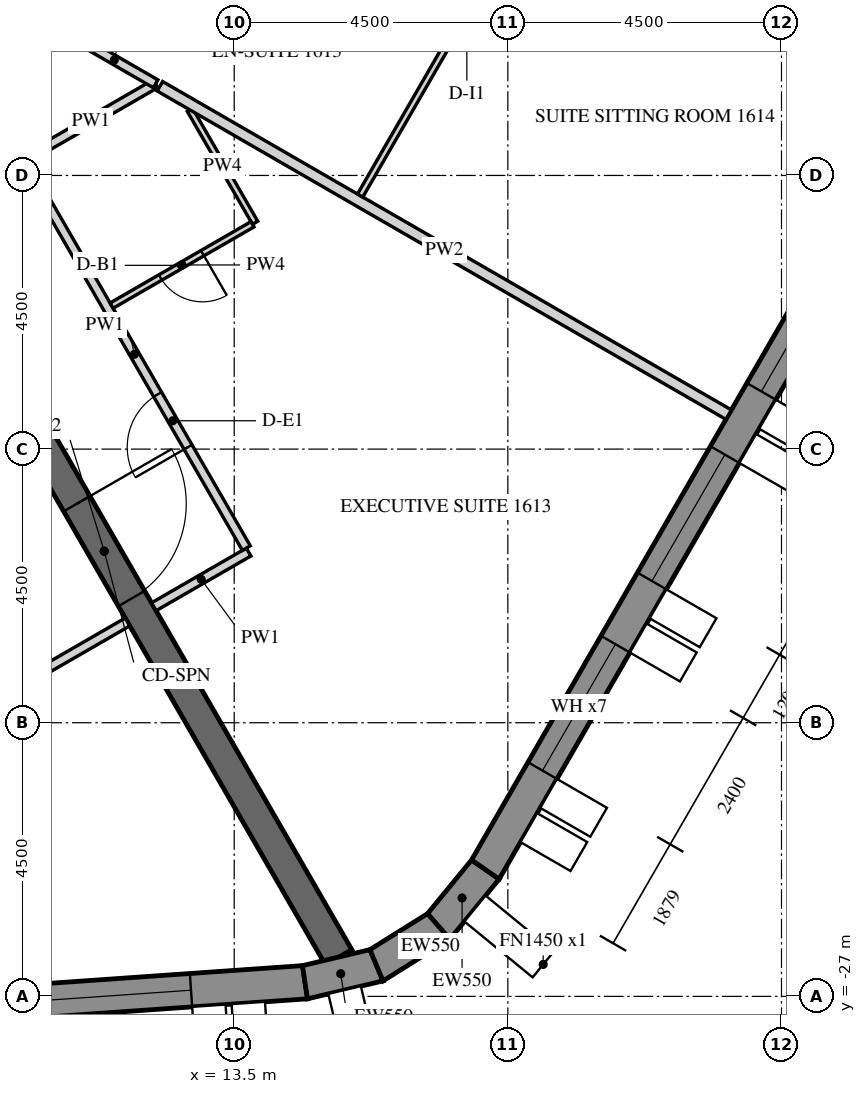
"""IFC4 building model, lengths in metres.
Left out: names, types, materials, properties, quantities, classifications, styles, units other than length and angle.
Written with IfcOpenShell. Run it as: python <this file> out.ifc"""

import sys

from ifc_helpers import new_model, si_unit, direction, frame, frame_2d, origin, place, context, subcontext, project, spatial, polyline, rectangle, outline, extrude, element, fill, save


model = new_model("IFC4")
c1 = context("Model", 3, precision=1e-05, world=origin(), true_north=direction((0.0, 1.0)))
c2 = subcontext(c1, "Body", "Model", "MODEL_VIEW")
j1 = project(units=[si_unit("LENGTHUNIT", "METRE"), si_unit("PLANEANGLEUNIT", "RADIAN")], contexts=[c1])
p1 = place(None, origin())
s1 = spatial("IfcSite", under=j1, at=p1, CompositionType="ELEMENT")
p2 = place(p1, origin())
s2 = spatial("IfcBuilding", under=s1, at=p2, CompositionType="ELEMENT")
p3 = place(p2, frame((0.0, 0.0, 207.3)))
s3 = spatial("IfcBuildingStorey", under=s2, at=p3, CompositionType="ELEMENT", Elevation=207.3)
p4 = place(p3, frame((-13.026, -28.704, -0.15), z_axis=(0.0, 0.0, 1.0), x_axis=(0.99756406806, 0.069756219185, 0.0)))
e1 = element("IfcWall", 1, at=p4, inside=s3, PredefinedType="SOLIDWALL", context=c2, shape_type="SweptSolid", body=[
    extrude(outline(polyline([(-0.026, -0.275), (27.78, -0.275), (27.735, 0.275), (0.026, 0.275), (-0.026, -0.275)])), origin(), (0.0, 0.0, 1.0), 3.9),
])
p5 = place(p4, frame((1.879, 0.0, 1.05)))
e2 = element("IfcOpeningElement", 2, at=p5, cuts=e1, PredefinedType="OPENING", context=c2, shape_type="SweptSolid", body=[
    extrude(rectangle(XDim=2.4, YDim=2.4, at=frame_2d((1.2, 1.2))), frame((0.0, 0.285, 0.0), z_axis=(0.0, -1.0, 0.0), x_axis=(1.0, 0.0, 0.0)), (0.0, 0.0, 1.0), 0.57),
])
p6 = place(p4, frame((5.479, 0.0, 1.05)))
e3 = element("IfcOpeningElement", 3, at=p6, cuts=e1, PredefinedType="OPENING", context=c2, shape_type="SweptSolid", body=[
    extrude(rectangle(XDim=2.4, YDim=2.4, at=frame_2d((1.2, 1.2))), frame((0.0, 0.285, 0.0), z_axis=(0.0, -1.0, 0.0), x_axis=(1.0, 0.0, 0.0)), (0.0, 0.0, 1.0), 0.57),
])
p7 = place(p4, frame((9.079, 0.0, 1.05)))
e4 = element("IfcOpeningElement", 4, at=p7, cuts=e1, PredefinedType="OPENING", context=c2, shape_type="SweptSolid", body=[
    extrude(rectangle(XDim=2.4, YDim=2.4, at=frame_2d((1.2, 1.2))), frame((0.0, 0.285, 0.0), z_axis=(0.0, -1.0, 0.0), x_axis=(1.0, 0.0, 0.0)), (0.0, 0.0, 1.0), 0.57),
])
p8 = place(p4, frame((12.679, 0.0, 1.05)))
e5 = element("IfcOpeningElement", 5, at=p8, cuts=e1, PredefinedType="OPENING", context=c2, shape_type="SweptSolid", body=[
    extrude(rectangle(XDim=2.4, YDim=2.4, at=frame_2d((1.2, 1.2))), frame((0.0, 0.285, 0.0), z_axis=(0.0, -1.0, 0.0), x_axis=(1.0, 0.0, 0.0)), (0.0, 0.0, 1.0), 0.57),
])
p9 = place(p4, frame((16.279, 0.0, 1.05)))
e6 = element("IfcOpeningElement", 6, at=p9, cuts=e1, PredefinedType="OPENING", context=c2, shape_type="SweptSolid", body=[
    extrude(rectangle(XDim=2.4, YDim=2.4, at=frame_2d((1.2, 1.2))), frame((0.0, 0.285, 0.0), z_axis=(0.0, -1.0, 0.0), x_axis=(1.0, 0.0, 0.0)), (0.0, 0.0, 1.0), 0.57),
])
p10 = place(p4, frame((19.879, 0.0, 1.05)))
e7 = element("IfcOpeningElement", 7, at=p10, cuts=e1, PredefinedType="OPENING", context=c2, shape_type="SweptSolid", body=[
    extrude(rectangle(XDim=2.4, YDim=2.4, at=frame_2d((1.2, 1.2))), frame((0.0, 0.285, 0.0), z_axis=(0.0, -1.0, 0.0), x_axis=(1.0, 0.0, 0.0)), (0.0, 0.0, 1.0), 0.57),
])
p11 = place(p4, frame((23.479, 0.0, 1.05)))
e8 = element("IfcOpeningElement", 8, at=p11, cuts=e1, PredefinedType="OPENING", context=c2, shape_type="SweptSolid", body=[
    extrude(rectangle(XDim=2.4, YDim=2.4, at=frame_2d((1.2, 1.2))), frame((0.0, 0.285, 0.0), z_axis=(0.0, -1.0, 0.0), x_axis=(1.0, 0.0, 0.0)), (0.0, 0.0, 1.0), 0.57),
])
p12 = place(p3, frame((14.664, -26.767, -0.15), z_axis=(0.0, 0.0, 1.0), x_axis=(0.973063591128, 0.230536868247, 0.0)))
e9 = element("IfcWall", 9, at=p12, inside=s3, PredefinedType="SOLIDWALL", context=c2, shape_type="SweptSolid", body=[
    extrude(outline(polyline([(-0.022, -0.275), (1.253, -0.275), (1.163, 0.275), (0.022, 0.275), (-0.022, -0.275)])), origin(), (0.0, 0.0, 1.0), 3.9),
])
p13 = place(p3, frame((15.84, -26.489, -0.15), z_axis=(0.0, 0.0, 1.0), x_axis=(0.848009655012, 0.52998077796, 0.0)))
e10 = element("IfcWall", 10, at=p13, inside=s3, PredefinedType="SOLIDWALL", context=c2, shape_type="SweptSolid", body=[
    extrude(outline(polyline([(-0.045, -0.275), (1.253, -0.275), (1.163, 0.275), (0.045, 0.275), (-0.045, -0.275)])), origin(), (0.0, 0.0, 1.0), 3.9),
])
p14 = place(p3, frame((16.864, -25.848, -0.15), z_axis=(0.0, 0.0, 1.0), x_axis=(0.633842757806, 0.773461930787, 0.0)))
e11 = element("IfcWall", 11, at=p14, inside=s3, PredefinedType="SOLIDWALL", context=c2, shape_type="SweptSolid", body=[
    extrude(outline(polyline([(-0.045, -0.275), (1.231, -0.275), (1.186, 0.275), (0.045, 0.275), (-0.045, -0.275)])), origin(), (0.0, 0.0, 1.0), 3.9),
])
p15 = place(p3, frame((17.63, -24.914, -0.15), z_axis=(0.0, 0.0, 1.0), x_axis=(0.499998569178, 0.866026229868, 0.0)))
e12 = element("IfcWall", 12, at=p15, inside=s3, PredefinedType="SOLIDWALL", context=c2, shape_type="SweptSolid", body=[
    extrude(outline(polyline([(-0.022, -0.275), (27.783, -0.275), (27.732, 0.275), (0.022, 0.275), (-0.022, -0.275)])), origin(), (0.0, 0.0, 1.0), 3.9),
])
p16 = place(p15, frame((1.879, 0.0, 1.05)))
e13 = element("IfcOpeningElement", 13, at=p16, cuts=e12, PredefinedType="OPENING", context=c2, shape_type="SweptSolid", body=[
    extrude(rectangle(XDim=2.4, YDim=2.4, at=frame_2d((1.2, 1.2))), frame((0.0, 0.285, 0.0), z_axis=(0.0, -1.0, 0.0), x_axis=(1.0, 0.0, 0.0)), (0.0, 0.0, 1.0), 0.57),
])
p17 = place(p15, frame((5.479, 0.0, 1.05)))
e14 = element("IfcOpeningElement", 14, at=p17, cuts=e12, PredefinedType="OPENING", context=c2, shape_type="SweptSolid", body=[
    extrude(rectangle(XDim=2.4, YDim=2.4, at=frame_2d((1.2, 1.2))), frame((0.0, 0.285, 0.0), z_axis=(0.0, -1.0, 0.0), x_axis=(1.0, 0.0, 0.0)), (0.0, 0.0, 1.0), 0.57),
])
p18 = place(p15, frame((9.079, 0.0, 1.05)))
e15 = element("IfcOpeningElement", 15, at=p18, cuts=e12, PredefinedType="OPENING", context=c2, shape_type="SweptSolid", body=[
    extrude(rectangle(XDim=2.4, YDim=2.4, at=frame_2d((1.2, 1.2))), frame((0.0, 0.285, 0.0), z_axis=(0.0, -1.0, 0.0), x_axis=(1.0, 0.0, 0.0)), (0.0, 0.0, 1.0), 0.57),
])
p19 = place(p15, frame((12.679, 0.0, 1.05)))
e16 = element("IfcOpeningElement", 16, at=p19, cuts=e12, PredefinedType="OPENING", context=c2, shape_type="SweptSolid", body=[
    extrude(rectangle(XDim=2.4, YDim=2.4, at=frame_2d((1.2, 1.2))), frame((0.0, 0.285, 0.0), z_axis=(0.0, -1.0, 0.0), x_axis=(1.0, 0.0, 0.0)), (0.0, 0.0, 1.0), 0.57),
])
p20 = place(p15, frame((16.279, 0.0, 1.05)))
e17 = element("IfcOpeningElement", 17, at=p20, cuts=e12, PredefinedType="OPENING", context=c2, shape_type="SweptSolid", body=[
    extrude(rectangle(XDim=2.4, YDim=2.4, at=frame_2d((1.2, 1.2))), frame((0.0, 0.285, 0.0), z_axis=(0.0, -1.0, 0.0), x_axis=(1.0, 0.0, 0.0)), (0.0, 0.0, 1.0), 0.57),
])
p21 = place(p15, frame((19.879, 0.0, 1.05)))
e18 = element("IfcOpeningElement", 18, at=p21, cuts=e12, PredefinedType="OPENING", context=c2, shape_type="SweptSolid", body=[
    extrude(rectangle(XDim=2.4, YDim=2.4, at=frame_2d((1.2, 1.2))), frame((0.0, 0.285, 0.0), z_axis=(0.0, -1.0, 0.0), x_axis=(1.0, 0.0, 0.0)), (0.0, 0.0, 1.0), 0.57),
])
p22 = place(p15, frame((23.479, 0.0, 1.05)))
e19 = element("IfcOpeningElement", 19, at=p22, cuts=e12, PredefinedType="OPENING", context=c2, shape_type="SweptSolid", body=[
    extrude(rectangle(XDim=2.4, YDim=2.4, at=frame_2d((1.2, 1.2))), frame((0.0, 0.285, 0.0), z_axis=(0.0, -1.0, 0.0), x_axis=(1.0, 0.0, 0.0)), (0.0, 0.0, 1.0), 0.57),
])
p23 = place(p3, frame((7.361, -12.75, -0.15), z_axis=(0.0, 0.0, 1.0), x_axis=(0.50000571537, 0.866022103989, 0.0)))
e20 = element("IfcWall", 20, at=p23, inside=s3, PredefinedType="SHEAR", context=c2, shape_type="SweptSolid", body=[
    extrude(outline(polyline([(-0.144, -0.25), (14.867, -0.25), (14.578, 0.25), (0.144, 0.25), (-0.144, -0.25)])), origin(), (0.0, 0.0, 1.0), 3.9),
])
p24 = place(p23, frame((6.49, 0.0, 0.15)))
e21 = element("IfcOpeningElement", 21, at=p24, cuts=e20, PredefinedType="OPENING", context=c2, shape_type="SweptSolid", body=[
    extrude(rectangle(XDim=1.8, YDim=2.4, at=frame_2d((0.9, 1.2))), frame((0.0, 0.26, 0.0), z_axis=(0.0, -1.0, 0.0), x_axis=(1.0, 0.0, 0.0)), (0.0, 0.0, 1.0), 0.52),
])
p25 = place(p3, frame((7.506, -13.0, -0.15), z_axis=(0.0, 0.0, 1.0), x_axis=(0.499988271576, -0.866032175087, 0.0)))
e22 = element("IfcWall", 22, at=p25, inside=s3, PredefinedType="SHEAR", context=c2, shape_type="SweptSolid", body=[
    extrude(rectangle(XDim=15.424, YDim=0.5, at=frame_2d((7.712, 0.0))), origin(), (0.0, 0.0, 1.0), 3.9),
])
p26 = place(p25, frame((6.812, 0.0, 0.15)))
e23 = element("IfcOpeningElement", 23, at=p26, cuts=e22, PredefinedType="OPENING", context=c2, shape_type="SweptSolid", body=[
    extrude(rectangle(XDim=1.8, YDim=2.4, at=frame_2d((0.9, 1.2))), frame((0.0, 0.26, 0.0), z_axis=(0.0, -1.0, 0.0), x_axis=(1.0, 0.0, 0.0)), (0.0, 0.0, 1.0), 0.52),
])
p27 = place(p3, frame((10.251, -21.705, 0.0), z_axis=(0.0, 0.0, 1.0), x_axis=(0.866013532718, 0.500020560727, 0.0)))
e24 = element("IfcWall", 24, at=p27, inside=s3, PredefinedType="PARTITIONING", context=c2, shape_type="SweptSolid", body=[
    extrude(rectangle(XDim=1.725, YDim=0.15, at=frame_2d((0.863, 0.0))), origin(), (0.0, 0.0, 1.0), 2.988),
])
p28 = place(p3, frame((12.178, -20.593, 0.0), z_axis=(0.0, 0.0, 1.0), x_axis=(0.866047807691, 0.499961193289, 0.0)))
e25 = element("IfcWall", 25, at=p28, inside=s3, PredefinedType="PARTITIONING", context=c2, shape_type="SweptSolid", body=[
    extrude(rectangle(XDim=1.8, YDim=0.15, at=frame_2d((0.9, 0.0))), origin(), (0.0, 0.0, 1.0), 2.988),
])
p29 = place(p3, frame((13.699, -19.628, 0.0), z_axis=(0.0, 0.0, 1.0), x_axis=(-0.499995202058, 0.86602817386, 0.0)))
e26 = element("IfcWall", 26, at=p29, inside=s3, PredefinedType="PARTITIONING", context=c2, shape_type="SweptSolid", body=[
    extrude(rectangle(XDim=7.361, YDim=0.15, at=frame_2d((3.68, 0.0))), origin(), (0.0, 0.0, 1.0), 2.988),
])
p30 = place(p29, frame((1.918, 0.0, 0.0)))
e27 = element("IfcOpeningElement", 27, at=p30, cuts=e26, PredefinedType="OPENING", context=c2, shape_type="SweptSolid", body=[
    extrude(rectangle(XDim=1.0, YDim=2.1, at=frame_2d((0.5, 1.05))), frame((0.0, 0.085, 0.0), z_axis=(0.0, -1.0, 0.0), x_axis=(1.0, 0.0, 0.0)), (0.0, 0.0, 1.0), 0.17),
])
p31 = place(p3, frame((10.084, -13.216, 0.0), z_axis=(0.0, 0.0, 1.0), x_axis=(0.866026229868, 0.499998569178, 0.0)))
e28 = element("IfcWall", 28, at=p31, inside=s3, PredefinedType="PARTITIONING", context=c2, shape_type="SweptSolid", body=[
    extrude(rectangle(XDim=2.449, YDim=0.15, at=frame_2d((1.225, 0.0))), origin(), (0.0, 0.0, 1.0), 2.988),
])
p32 = place(p3, frame((12.208, -11.993, 0.0), z_axis=(0.0, 0.0, 1.0), x_axis=(-0.866011891242, 0.50002340368, 0.0)))
e29 = element("IfcWall", 29, at=p32, inside=s3, PredefinedType="PARTITIONING", context=c2, shape_type="SweptSolid", body=[
    extrude(rectangle(XDim=1.568, YDim=0.15, at=frame_2d((0.784, 0.0))), origin(), (0.0, 0.0, 1.0), 2.988),
])
p33 = place(p3, frame((12.772, -12.423, 0.0), z_axis=(0.0, 0.0, 1.0), x_axis=(0.500061136393, -0.865990103794, 0.0)))
e30 = element("IfcWall", 30, at=p33, inside=s3, PredefinedType="PARTITIONING", context=c2, shape_type="SweptSolid", body=[
    extrude(rectangle(XDim=2.142, YDim=0.1, at=frame_2d((1.071, 0.0))), origin(), (0.0, 0.0, 1.0), 2.988),
])
p34 = place(p3, frame((13.8, -14.303, 0.0), z_axis=(0.0, 0.0, 1.0), x_axis=(-0.866021425885, -0.500006889861, 0.0)))
e31 = element("IfcWall", 31, at=p34, inside=s3, PredefinedType="PARTITIONING", context=c2, shape_type="SweptSolid", body=[
    extrude(rectangle(XDim=2.675, YDim=0.1, at=frame_2d((1.337, 0.0))), origin(), (0.0, 0.0, 1.0), 2.988),
])
p35 = place(p34, frame((0.95, 0.0, 0.0)))
e32 = element("IfcOpeningElement", 32, at=p35, cuts=e31, PredefinedType="OPENING", context=c2, shape_type="SweptSolid", body=[
    extrude(rectangle(XDim=0.8, YDim=2.1, at=frame_2d((0.4, 1.05))), frame((0.0, 0.06, 0.0), z_axis=(0.0, -1.0, 0.0), x_axis=(1.0, 0.0, 0.0)), (0.0, 0.0, 1.0), 0.12),
])
p36 = place(p3, frame((21.631, -17.433, 0.0), z_axis=(0.0, 0.0, 1.0), x_axis=(-0.866029744906, 0.499992480882, 0.0)))
e33 = element("IfcWall", 33, at=p36, inside=s3, PredefinedType="PARTITIONING", context=c2, shape_type="SweptSolid", body=[
    extrude(rectangle(XDim=10.801, YDim=0.18, at=frame_2d((5.4, 0.0))), origin(), (0.0, 0.0, 1.0), 2.988),
])
p37 = place(p3, frame((15.571, -13.831, 0.0), z_axis=(0.0, 0.0, 1.0), x_axis=(0.5000167099, 0.866015756104, 0.0)))
e34 = element("IfcWall", 34, at=p37, inside=s3, PredefinedType="PARTITIONING", context=c2, shape_type="SweptSolid", body=[
    extrude(rectangle(XDim=7.11, YDim=0.1, at=frame_2d((3.555, 0.0))), origin(), (0.0, 0.0, 1.0), 2.988),
])
p38 = place(p37, frame((3.06, 0.0, 0.0)))
e35 = element("IfcOpeningElement", 35, at=p38, cuts=e34, PredefinedType="OPENING", context=c2, shape_type="SweptSolid", body=[
    extrude(rectangle(XDim=0.9, YDim=2.1, at=frame_2d((0.45, 1.05))), frame((0.0, 0.06, 0.0), z_axis=(0.0, -1.0, 0.0), x_axis=(1.0, 0.0, 0.0)), (0.0, 0.0, 1.0), 0.12),
])
p39 = place(p11, frame((0.0, 0.205, 0.0)))
e36 = element("IfcWindow", 36, at=p39, inside=s3, PartitioningType="DOUBLE_PANEL_VERTICAL", PredefinedType="WINDOW", context=c2, shape_type="SweptSolid", body=[
    extrude(rectangle(XDim=2.4, YDim=2.4, at=frame_2d((1.2, 1.2))), frame((0.0, 0.03, 0.0), z_axis=(0.0, -1.0, 0.0), x_axis=(1.0, 0.0, 0.0)), (0.0, 0.0, 1.0), 0.06),
])
fill(e8, e36)
p40 = place(p16, frame((0.0, 0.205, 0.0)))
e37 = element("IfcWindow", 37, at=p40, inside=s3, PartitioningType="DOUBLE_PANEL_VERTICAL", PredefinedType="WINDOW", context=c2, shape_type="SweptSolid", body=[
    extrude(rectangle(XDim=2.4, YDim=2.4, at=frame_2d((1.2, 1.2))), frame((0.0, 0.03, 0.0), z_axis=(0.0, -1.0, 0.0), x_axis=(1.0, 0.0, 0.0)), (0.0, 0.0, 1.0), 0.06),
])
fill(e13, e37)
p41 = place(p17, frame((0.0, 0.205, 0.0)))
e38 = element("IfcWindow", 38, at=p41, inside=s3, PartitioningType="DOUBLE_PANEL_VERTICAL", PredefinedType="WINDOW", context=c2, shape_type="SweptSolid", body=[
    extrude(rectangle(XDim=2.4, YDim=2.4, at=frame_2d((1.2, 1.2))), frame((0.0, 0.03, 0.0), z_axis=(0.0, -1.0, 0.0), x_axis=(1.0, 0.0, 0.0)), (0.0, 0.0, 1.0), 0.06),
])
fill(e14, e38)
p42 = place(p18, frame((0.0, 0.205, 0.0)))
e39 = element("IfcWindow", 39, at=p42, inside=s3, PartitioningType="DOUBLE_PANEL_VERTICAL", PredefinedType="WINDOW", context=c2, shape_type="SweptSolid", body=[
    extrude(rectangle(XDim=2.4, YDim=2.4, at=frame_2d((1.2, 1.2))), frame((0.0, 0.03, 0.0), z_axis=(0.0, -1.0, 0.0), x_axis=(1.0, 0.0, 0.0)), (0.0, 0.0, 1.0), 0.06),
])
fill(e15, e39)
p43 = place(p26, origin())
e40 = element("IfcDoor", 40, at=p43, inside=s3, OperationType="DOUBLE_DOOR_SINGLE_SWING", PredefinedType="DOOR", context=c2, shape_type="SweptSolid", body=[
    extrude(rectangle(XDim=1.8, YDim=2.4, at=frame_2d((0.9, 1.2))), frame((0.0, 0.025, 0.0), z_axis=(0.0, -1.0, 0.0), x_axis=(1.0, 0.0, 0.0)), (0.0, 0.0, 1.0), 0.05),
])
fill(e23, e40)
p44 = place(p30, origin())
e41 = element("IfcDoor", 41, at=p44, inside=s3, OperationType="SINGLE_SWING_LEFT", PredefinedType="DOOR", context=c2, shape_type="SweptSolid", body=[
    extrude(rectangle(XDim=1.0, YDim=2.1, at=frame_2d((0.5, 1.05))), frame((0.0, 0.025, 0.0), z_axis=(0.0, -1.0, 0.0), x_axis=(1.0, 0.0, 0.0)), (0.0, 0.0, 1.0), 0.05),
])
fill(e27, e41)
p45 = place(p35, origin())
e42 = element("IfcDoor", 42, at=p45, inside=s3, OperationType="SINGLE_SWING_RIGHT", PredefinedType="DOOR", context=c2, shape_type="SweptSolid", body=[
    extrude(rectangle(XDim=0.8, YDim=2.1, at=frame_2d((0.4, 1.05))), frame((0.0, 0.025, 0.0), z_axis=(0.0, -1.0, 0.0), x_axis=(1.0, 0.0, 0.0)), (0.0, 0.0, 1.0), 0.05),
])
fill(e32, e42)
save(model, sys.argv[1])
